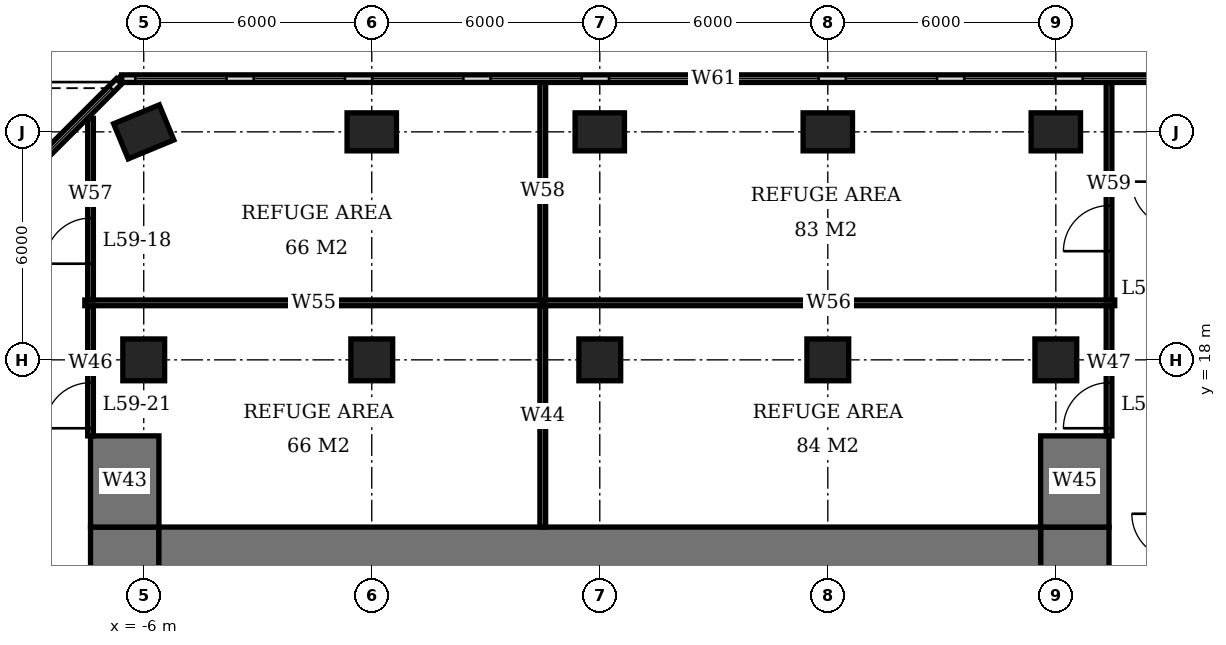
"""IFC4 building model, lengths in metres.
Left out: names, types, materials, properties, quantities, classifications, styles, units other than length and angle.
Written with IfcOpenShell. Run it as: python <this file> out.ifc"""

import sys

from ifc_helpers import new_model, si_unit, direction, frame, frame_2d, origin, origin_2d, place, context, subcontext, project, spatial, rectangle, extrude, element, fill, save


model = new_model("IFC4")
c1 = context("Model", 3, precision=1e-05, world=origin(), true_north=direction((0.0, 1.0)))
c2 = subcontext(c1, "Body", "Model", "MODEL_VIEW")
j1 = project(units=[si_unit("LENGTHUNIT", "METRE"), si_unit("PLANEANGLEUNIT", "RADIAN")], contexts=[c1])
p1 = place(None, origin())
s1 = spatial("IfcSite", under=j1, at=p1, CompositionType="ELEMENT")
p2 = place(p1, origin())
s2 = spatial("IfcBuilding", under=s1, at=p2, CompositionType="ELEMENT")
p3 = place(p2, frame((0.0, 0.0, 239.6)))
s3 = spatial("IfcBuildingStorey", under=s2, at=p3, CompositionType="ELEMENT", Elevation=239.6)
p4 = place(p3, frame((-6.0, 18.0, 0.0), z_axis=(0.0, 0.0, 1.0), x_axis=(1.0, 0.0, 0.0)))
e1 = element("IfcColumn", 1, at=p4, inside=s3, PredefinedType="COLUMN", context=c2, shape_type="SweptSolid", body=[
    extrude(rectangle(XDim=1.1, YDim=1.1, at=origin_2d()), origin(), (0.0, 0.0, 1.0), 5.4),
])
p5 = place(p3, frame((-6.0, 24.0, 0.0), z_axis=(0.0, 0.0, 1.0), x_axis=(0.923879532511, 0.382683432365, 0.0)))
e2 = element("IfcColumn", 2, at=p5, inside=s3, PredefinedType="COLUMN", context=c2, shape_type="SweptSolid", body=[
    extrude(rectangle(XDim=1.3, YDim=1.0, at=origin_2d()), origin(), (0.0, 0.0, 1.0), 5.4),
])
p6 = place(p3, frame((0.0, 18.0, 0.0), z_axis=(0.0, 0.0, 1.0), x_axis=(1.0, 0.0, 0.0)))
e3 = element("IfcColumn", 3, at=p6, inside=s3, PredefinedType="COLUMN", context=c2, shape_type="SweptSolid", body=[
    extrude(rectangle(XDim=1.1, YDim=1.1, at=origin_2d()), origin(), (0.0, 0.0, 1.0), 5.4),
])
p7 = place(p3, frame((0.0, 24.0, 0.0), z_axis=(0.0, 0.0, 1.0), x_axis=(1.0, 0.0, 0.0)))
e4 = element("IfcColumn", 4, at=p7, inside=s3, PredefinedType="COLUMN", context=c2, shape_type="SweptSolid", body=[
    extrude(rectangle(XDim=1.3, YDim=1.0, at=origin_2d()), origin(), (0.0, 0.0, 1.0), 5.4),
])
p8 = place(p3, frame((6.0, 18.0, 0.0), z_axis=(0.0, 0.0, 1.0), x_axis=(1.0, 0.0, 0.0)))
e5 = element("IfcColumn", 5, at=p8, inside=s3, PredefinedType="COLUMN", context=c2, shape_type="SweptSolid", body=[
    extrude(rectangle(XDim=1.1, YDim=1.1, at=origin_2d()), origin(), (0.0, 0.0, 1.0), 5.4),
])
p9 = place(p3, frame((6.0, 24.0, 0.0), z_axis=(0.0, 0.0, 1.0), x_axis=(1.0, 0.0, 0.0)))
e6 = element("IfcColumn", 6, at=p9, inside=s3, PredefinedType="COLUMN", context=c2, shape_type="SweptSolid", body=[
    extrude(rectangle(XDim=1.3, YDim=1.0, at=origin_2d()), origin(), (0.0, 0.0, 1.0), 5.4),
])
p10 = place(p3, frame((12.0, 18.0, 0.0), z_axis=(0.0, 0.0, 1.0), x_axis=(1.0, 0.0, 0.0)))
e7 = element("IfcColumn", 7, at=p10, inside=s3, PredefinedType="COLUMN", context=c2, shape_type="SweptSolid", body=[
    extrude(rectangle(XDim=1.1, YDim=1.1, at=origin_2d()), origin(), (0.0, 0.0, 1.0), 5.4),
])
p11 = place(p3, frame((12.0, 24.0, 0.0), z_axis=(0.0, 0.0, 1.0), x_axis=(1.0, 0.0, 0.0)))
e8 = element("IfcColumn", 8, at=p11, inside=s3, PredefinedType="COLUMN", context=c2, shape_type="SweptSolid", body=[
    extrude(rectangle(XDim=1.3, YDim=1.0, at=origin_2d()), origin(), (0.0, 0.0, 1.0), 5.4),
])
p12 = place(p3, frame((18.0, 18.0, 0.0), z_axis=(0.0, 0.0, 1.0), x_axis=(1.0, 0.0, 0.0)))
e9 = element("IfcColumn", 9, at=p12, inside=s3, PredefinedType="COLUMN", context=c2, shape_type="SweptSolid", body=[
    extrude(rectangle(XDim=1.1, YDim=1.1, at=origin_2d()), origin(), (0.0, 0.0, 1.0), 5.4),
])
p13 = place(p3, frame((18.0, 24.0, 0.0), z_axis=(0.0, 0.0, 1.0), x_axis=(1.0, 0.0, 0.0)))
e10 = element("IfcColumn", 10, at=p13, inside=s3, PredefinedType="COLUMN", context=c2, shape_type="SweptSolid", body=[
    extrude(rectangle(XDim=1.3, YDim=1.0, at=origin_2d()), origin(), (0.0, 0.0, 1.0), 5.4),
])
p14 = place(p3, frame((-5.6, 12.6, 0.0), z_axis=(0.0, 0.0, 1.0), x_axis=(1.0, 0.0, 0.0)))
e11 = element("IfcWall", 11, at=p14, inside=s3, PredefinedType="SHEAR", context=c2, shape_type="SweptSolid", body=[
    extrude(rectangle(XDim=23.2, YDim=2.0, at=frame_2d((11.6, 0.0))), origin(), (0.0, 0.0, 1.0), 5.4),
])
p15 = place(p3, frame((-6.5, -7.6, 0.0), z_axis=(0.0, 0.0, 1.0), x_axis=(0.0, 1.0, 0.0)))
e12 = element("IfcWall", 12, at=p15, inside=s3, PredefinedType="SHEAR", context=c2, shape_type="SweptSolid", body=[
    extrude(rectangle(XDim=21.2, YDim=1.8, at=frame_2d((10.6, 0.0))), origin(), (0.0, 0.0, 1.0), 5.4),
])
p16 = place(p15, frame((7.8, 0.0, 0.0)))
e13 = element("IfcOpeningElement", 13, at=p16, cuts=e12, PredefinedType="OPENING", context=c2, shape_type="SweptSolid", body=[
    extrude(rectangle(XDim=1.8, YDim=2.4, at=frame_2d((0.9, 1.2))), frame((0.0, 0.91, 0.0), z_axis=(0.0, -1.0, 0.0), x_axis=(1.0, 0.0, 0.0)), (0.0, 0.0, 1.0), 1.82),
])
p17 = place(p3, frame((18.5, -7.6, 0.0), z_axis=(0.0, 0.0, 1.0), x_axis=(0.0, 1.0, 0.0)))
e14 = element("IfcWall", 14, at=p17, inside=s3, PredefinedType="SHEAR", context=c2, shape_type="SweptSolid", body=[
    extrude(rectangle(XDim=21.2, YDim=1.8, at=frame_2d((10.6, 0.0))), origin(), (0.0, 0.0, 1.0), 5.4),
])
p18 = place(p17, frame((9.2, 0.0, 0.0)))
e15 = element("IfcOpeningElement", 15, at=p18, cuts=e14, PredefinedType="OPENING", context=c2, shape_type="SweptSolid", body=[
    extrude(rectangle(XDim=1.8, YDim=2.4, at=frame_2d((0.9, 1.2))), frame((0.0, 0.91, 0.0), z_axis=(0.0, -1.0, 0.0), x_axis=(1.0, 0.0, 0.0)), (0.0, 0.0, 1.0), 1.82),
])
for number, where, z_axis, x_axis in (
    (16, (-6.5, 13.6, 0.0), (0.0, 0.0, 1.0), (0.0, 1.0, 0.0)),
    (17, (18.5, 13.6, 0.0), (0.0, 0.0, 1.0), (0.0, 1.0, 0.0)),
):
    element("IfcWall", number, at=place(p3, frame(where, z_axis=z_axis, x_axis=x_axis)), inside=s3, PredefinedType="SHEAR", context=c2, shape_type="SweptSolid", body=[
        extrude(rectangle(XDim=2.4, YDim=1.8, at=frame_2d((1.2, 0.0))), origin(), (0.0, 0.0, 1.0), 5.4),
    ])
p19 = place(p3, frame((24.58, 25.4, 0.0), z_axis=(0.0, 0.0, 1.0), x_axis=(-1.0, 0.0, 0.0)))
e18 = element("IfcWall", 18, at=p19, inside=s3, PredefinedType="USERDEFINED", context=c2, shape_type="SweptSolid", body=[
    extrude(rectangle(XDim=31.16, YDim=0.2, at=frame_2d((15.58, 0.0))), origin(), (0.0, 0.0, 1.0), 5.4),
])
p20 = place(p19, frame((0.358, 0.0, 0.6)))
e19 = element("IfcOpeningElement", 19, at=p20, cuts=e18, PredefinedType="OPENING", context=c2, shape_type="SweptSolid", body=[
    extrude(rectangle(XDim=2.4, YDim=3.0, at=frame_2d((1.2, 1.5))), frame((0.0, 0.11, 0.0), z_axis=(0.0, -1.0, 0.0), x_axis=(1.0, 0.0, 0.0)), (0.0, 0.0, 1.0), 0.22),
])
p21 = place(p19, frame((3.474, 0.0, 0.6)))
e20 = element("IfcOpeningElement", 20, at=p21, cuts=e18, PredefinedType="OPENING", context=c2, shape_type="SweptSolid", body=[
    extrude(rectangle(XDim=2.4, YDim=3.0, at=frame_2d((1.2, 1.5))), frame((0.0, 0.11, 0.0), z_axis=(0.0, -1.0, 0.0), x_axis=(1.0, 0.0, 0.0)), (0.0, 0.0, 1.0), 0.22),
])
p22 = place(p19, frame((6.59, 0.0, 0.6)))
e21 = element("IfcOpeningElement", 21, at=p22, cuts=e18, PredefinedType="OPENING", context=c2, shape_type="SweptSolid", body=[
    extrude(rectangle(XDim=2.4, YDim=3.0, at=frame_2d((1.2, 1.5))), frame((0.0, 0.11, 0.0), z_axis=(0.0, -1.0, 0.0), x_axis=(1.0, 0.0, 0.0)), (0.0, 0.0, 1.0), 0.22),
])
p23 = place(p19, frame((9.706, 0.0, 0.6)))
e22 = element("IfcOpeningElement", 22, at=p23, cuts=e18, PredefinedType="OPENING", context=c2, shape_type="SweptSolid", body=[
    extrude(rectangle(XDim=2.4, YDim=3.0, at=frame_2d((1.2, 1.5))), frame((0.0, 0.11, 0.0), z_axis=(0.0, -1.0, 0.0), x_axis=(1.0, 0.0, 0.0)), (0.0, 0.0, 1.0), 0.22),
])
p24 = place(p19, frame((12.822, 0.0, 0.6)))
e23 = element("IfcOpeningElement", 23, at=p24, cuts=e18, PredefinedType="OPENING", context=c2, shape_type="SweptSolid", body=[
    extrude(rectangle(XDim=2.4, YDim=3.0, at=frame_2d((1.2, 1.5))), frame((0.0, 0.11, 0.0), z_axis=(0.0, -1.0, 0.0), x_axis=(1.0, 0.0, 0.0)), (0.0, 0.0, 1.0), 0.22),
])
p25 = place(p19, frame((15.938, 0.0, 0.6)))
e24 = element("IfcOpeningElement", 24, at=p25, cuts=e18, PredefinedType="OPENING", context=c2, shape_type="SweptSolid", body=[
    extrude(rectangle(XDim=2.4, YDim=3.0, at=frame_2d((1.2, 1.5))), frame((0.0, 0.11, 0.0), z_axis=(0.0, -1.0, 0.0), x_axis=(1.0, 0.0, 0.0)), (0.0, 0.0, 1.0), 0.22),
])
p26 = place(p19, frame((19.054, 0.0, 0.6)))
e25 = element("IfcOpeningElement", 25, at=p26, cuts=e18, PredefinedType="OPENING", context=c2, shape_type="SweptSolid", body=[
    extrude(rectangle(XDim=2.4, YDim=3.0, at=frame_2d((1.2, 1.5))), frame((0.0, 0.11, 0.0), z_axis=(0.0, -1.0, 0.0), x_axis=(1.0, 0.0, 0.0)), (0.0, 0.0, 1.0), 0.22),
])
p27 = place(p19, frame((22.17, 0.0, 0.6)))
e26 = element("IfcOpeningElement", 26, at=p27, cuts=e18, PredefinedType="OPENING", context=c2, shape_type="SweptSolid", body=[
    extrude(rectangle(XDim=2.4, YDim=3.0, at=frame_2d((1.2, 1.5))), frame((0.0, 0.11, 0.0), z_axis=(0.0, -1.0, 0.0), x_axis=(1.0, 0.0, 0.0)), (0.0, 0.0, 1.0), 0.22),
])
p28 = place(p19, frame((25.286, 0.0, 0.6)))
e27 = element("IfcOpeningElement", 27, at=p28, cuts=e18, PredefinedType="OPENING", context=c2, shape_type="SweptSolid", body=[
    extrude(rectangle(XDim=2.4, YDim=3.0, at=frame_2d((1.2, 1.5))), frame((0.0, 0.11, 0.0), z_axis=(0.0, -1.0, 0.0), x_axis=(1.0, 0.0, 0.0)), (0.0, 0.0, 1.0), 0.22),
])
p29 = place(p19, frame((28.402, 0.0, 0.6)))
e28 = element("IfcOpeningElement", 28, at=p29, cuts=e18, PredefinedType="OPENING", context=c2, shape_type="SweptSolid", body=[
    extrude(rectangle(XDim=2.4, YDim=3.0, at=frame_2d((1.2, 1.5))), frame((0.0, 0.11, 0.0), z_axis=(0.0, -1.0, 0.0), x_axis=(1.0, 0.0, 0.0)), (0.0, 0.0, 1.0), 0.22),
])
p30 = place(p3, frame((-6.651, 25.329, 0.0), z_axis=(0.0, 0.0, 1.0), x_axis=(-0.707106781187, -0.707106781187, 0.0)))
e29 = element("IfcWall", 29, at=p30, inside=s3, PredefinedType="USERDEFINED", context=c2, shape_type="SweptSolid", body=[
    extrude(rectangle(XDim=9.445, YDim=0.2, at=frame_2d((4.723, 0.0))), origin(), (0.0, 0.0, 1.0), 5.4),
])
p31 = place(p30, frame((0.274, 0.0, 0.6)))
e30 = element("IfcOpeningElement", 30, at=p31, cuts=e29, PredefinedType="OPENING", context=c2, shape_type="SweptSolid", body=[
    extrude(rectangle(XDim=2.6, YDim=3.0, at=frame_2d((1.3, 1.5))), frame((0.0, 0.11, 0.0), z_axis=(0.0, -1.0, 0.0), x_axis=(1.0, 0.0, 0.0)), (0.0, 0.0, 1.0), 0.22),
])
p32 = place(p30, frame((3.423, 0.0, 0.6)))
e31 = element("IfcOpeningElement", 31, at=p32, cuts=e29, PredefinedType="OPENING", context=c2, shape_type="SweptSolid", body=[
    extrude(rectangle(XDim=2.6, YDim=3.0, at=frame_2d((1.3, 1.5))), frame((0.0, 0.11, 0.0), z_axis=(0.0, -1.0, 0.0), x_axis=(1.0, 0.0, 0.0)), (0.0, 0.0, 1.0), 0.22),
])
p33 = place(p30, frame((6.571, 0.0, 0.6)))
e32 = element("IfcOpeningElement", 32, at=p33, cuts=e29, PredefinedType="OPENING", context=c2, shape_type="SweptSolid", body=[
    extrude(rectangle(XDim=2.6, YDim=3.0, at=frame_2d((1.3, 1.5))), frame((0.0, 0.11, 0.0), z_axis=(0.0, -1.0, 0.0), x_axis=(1.0, 0.0, 0.0)), (0.0, 0.0, 1.0), 0.22),
])
p34 = place(p3, frame((-7.4, 16.0, 0.0), z_axis=(0.0, 0.0, 1.0), x_axis=(0.0, 1.0, 0.0)))
e33 = element("IfcWall", 33, at=p34, inside=s3, PredefinedType="PARTITIONING", context=c2, shape_type="SweptSolid", body=[
    extrude(rectangle(XDim=3.425, YDim=0.15, at=frame_2d((1.712, 0.0))), origin(), (0.0, 0.0, 1.0), 5.15),
])
p35 = place(p34, frame((0.2, 0.0, 0.0)))
e34 = element("IfcOpeningElement", 34, at=p35, cuts=e33, PredefinedType="OPENING", context=c2, shape_type="SweptSolid", body=[
    extrude(rectangle(XDim=1.2, YDim=2.4, at=frame_2d((0.6, 1.2))), frame((0.0, 0.085, 0.0), z_axis=(0.0, -1.0, 0.0), x_axis=(1.0, 0.0, 0.0)), (0.0, 0.0, 1.0), 0.17),
])
p36 = place(p3, frame((-7.4, 19.575, 0.0), z_axis=(0.0, 0.0, 1.0), x_axis=(0.0, 1.0, 0.0)))
e35 = element("IfcWall", 35, at=p36, inside=s3, PredefinedType="PARTITIONING", context=c2, shape_type="SweptSolid", body=[
    extrude(rectangle(XDim=4.781, YDim=0.15, at=frame_2d((2.391, 0.0))), origin(), (0.0, 0.0, 1.0), 5.15),
])
p37 = place(p36, frame((0.955, 0.0, 0.0)))
e36 = element("IfcOpeningElement", 36, at=p37, cuts=e35, PredefinedType="OPENING", context=c2, shape_type="SweptSolid", body=[
    extrude(rectangle(XDim=1.2, YDim=2.4, at=frame_2d((0.6, 1.2))), frame((0.0, 0.085, 0.0), z_axis=(0.0, -1.0, 0.0), x_axis=(1.0, 0.0, 0.0)), (0.0, 0.0, 1.0), 0.17),
])
p38 = place(p3, frame((-7.55, 19.5, 0.0), z_axis=(0.0, 0.0, 1.0), x_axis=(1.0, 0.0, 0.0)))
e37 = element("IfcWall", 37, at=p38, inside=s3, PredefinedType="PARTITIONING", context=c2, shape_type="SweptSolid", body=[
    extrude(rectangle(XDim=12.05, YDim=0.15, at=frame_2d((6.025, 0.0))), origin(), (0.0, 0.0, 1.0), 5.15),
])
p39 = place(p3, frame((4.5, 13.6, 0.0), z_axis=(0.0, 0.0, 1.0), x_axis=(0.0, 1.0, 0.0)))
e38 = element("IfcWall", 38, at=p39, inside=s3, PredefinedType="PARTITIONING", context=c2, shape_type="SweptSolid", body=[
    extrude(rectangle(XDim=5.825, YDim=0.15, at=frame_2d((2.913, 0.0))), origin(), (0.0, 0.0, 1.0), 5.15),
])
p40 = place(p3, frame((4.5, 19.575, 0.0), z_axis=(0.0, 0.0, 1.0), x_axis=(0.0, 1.0, 0.0)))
e39 = element("IfcWall", 39, at=p40, inside=s3, PredefinedType="PARTITIONING", context=c2, shape_type="SweptSolid", body=[
    extrude(rectangle(XDim=5.725, YDim=0.15, at=frame_2d((2.863, 0.0))), origin(), (0.0, 0.0, 1.0), 5.15),
])
p41 = place(p3, frame((4.5, 19.5, 0.0), z_axis=(0.0, 0.0, 1.0), x_axis=(1.0, 0.0, 0.0)))
e40 = element("IfcWall", 40, at=p41, inside=s3, PredefinedType="PARTITIONING", context=c2, shape_type="SweptSolid", body=[
    extrude(rectangle(XDim=15.05, YDim=0.15, at=frame_2d((7.525, 0.0))), origin(), (0.0, 0.0, 1.0), 5.15),
])
p42 = place(p3, frame((19.4, 16.0, 0.0), z_axis=(0.0, 0.0, 1.0), x_axis=(0.0, 1.0, 0.0)))
e41 = element("IfcWall", 41, at=p42, inside=s3, PredefinedType="PARTITIONING", context=c2, shape_type="SweptSolid", body=[
    extrude(rectangle(XDim=3.425, YDim=0.15, at=frame_2d((1.712, 0.0))), origin(), (0.0, 0.0, 1.0), 5.15),
])
p43 = place(p42, frame((0.2, 0.0, 0.0)))
e42 = element("IfcOpeningElement", 42, at=p43, cuts=e41, PredefinedType="OPENING", context=c2, shape_type="SweptSolid", body=[
    extrude(rectangle(XDim=1.2, YDim=2.4, at=frame_2d((0.6, 1.2))), frame((0.0, 0.085, 0.0), z_axis=(0.0, -1.0, 0.0), x_axis=(1.0, 0.0, 0.0)), (0.0, 0.0, 1.0), 0.17),
])
p44 = place(p3, frame((19.4, 19.575, 0.0), z_axis=(0.0, 0.0, 1.0), x_axis=(0.0, 1.0, 0.0)))
e43 = element("IfcWall", 43, at=p44, inside=s3, PredefinedType="PARTITIONING", context=c2, shape_type="SweptSolid", body=[
    extrude(rectangle(XDim=5.725, YDim=0.15, at=frame_2d((2.863, 0.0))), origin(), (0.0, 0.0, 1.0), 5.15),
])
p45 = place(p44, frame((1.285, 0.0, 0.0)))
e44 = element("IfcOpeningElement", 44, at=p45, cuts=e43, PredefinedType="OPENING", context=c2, shape_type="SweptSolid", body=[
    extrude(rectangle(XDim=1.2, YDim=2.4, at=frame_2d((0.6, 1.2))), frame((0.0, 0.085, 0.0), z_axis=(0.0, -1.0, 0.0), x_axis=(1.0, 0.0, 0.0)), (0.0, 0.0, 1.0), 0.17),
])
p46 = place(p21, origin())
e45 = element("IfcWindow", 45, at=p46, inside=s3, PartitioningType="SINGLE_PANEL", PredefinedType="USERDEFINED", context=c2, shape_type="SweptSolid", body=[
    extrude(rectangle(XDim=2.4, YDim=3.0, at=frame_2d((1.2, 1.5))), frame((0.0, 0.03, 0.0), z_axis=(0.0, -1.0, 0.0), x_axis=(1.0, 0.0, 0.0)), (0.0, 0.0, 1.0), 0.06),
])
fill(e20, e45)
p47 = place(p22, origin())
e46 = element("IfcWindow", 46, at=p47, inside=s3, PartitioningType="SINGLE_PANEL", PredefinedType="USERDEFINED", context=c2, shape_type="SweptSolid", body=[
    extrude(rectangle(XDim=2.4, YDim=3.0, at=frame_2d((1.2, 1.5))), frame((0.0, 0.03, 0.0), z_axis=(0.0, -1.0, 0.0), x_axis=(1.0, 0.0, 0.0)), (0.0, 0.0, 1.0), 0.06),
])
fill(e21, e46)
p48 = place(p23, origin())
e47 = element("IfcWindow", 47, at=p48, inside=s3, PartitioningType="SINGLE_PANEL", PredefinedType="USERDEFINED", context=c2, shape_type="SweptSolid", body=[
    extrude(rectangle(XDim=2.4, YDim=3.0, at=frame_2d((1.2, 1.5))), frame((0.0, 0.03, 0.0), z_axis=(0.0, -1.0, 0.0), x_axis=(1.0, 0.0, 0.0)), (0.0, 0.0, 1.0), 0.06),
])
fill(e22, e47)
p49 = place(p24, origin())
e48 = element("IfcWindow", 48, at=p49, inside=s3, PartitioningType="SINGLE_PANEL", PredefinedType="USERDEFINED", context=c2, shape_type="SweptSolid", body=[
    extrude(rectangle(XDim=2.4, YDim=3.0, at=frame_2d((1.2, 1.5))), frame((0.0, 0.03, 0.0), z_axis=(0.0, -1.0, 0.0), x_axis=(1.0, 0.0, 0.0)), (0.0, 0.0, 1.0), 0.06),
])
fill(e23, e48)
p50 = place(p25, origin())
e49 = element("IfcWindow", 49, at=p50, inside=s3, PartitioningType="SINGLE_PANEL", PredefinedType="USERDEFINED", context=c2, shape_type="SweptSolid", body=[
    extrude(rectangle(XDim=2.4, YDim=3.0, at=frame_2d((1.2, 1.5))), frame((0.0, 0.03, 0.0), z_axis=(0.0, -1.0, 0.0), x_axis=(1.0, 0.0, 0.0)), (0.0, 0.0, 1.0), 0.06),
])
fill(e24, e49)
p51 = place(p26, origin())
e50 = element("IfcWindow", 50, at=p51, inside=s3, PartitioningType="SINGLE_PANEL", PredefinedType="USERDEFINED", context=c2, shape_type="SweptSolid", body=[
    extrude(rectangle(XDim=2.4, YDim=3.0, at=frame_2d((1.2, 1.5))), frame((0.0, 0.03, 0.0), z_axis=(0.0, -1.0, 0.0), x_axis=(1.0, 0.0, 0.0)), (0.0, 0.0, 1.0), 0.06),
])
fill(e25, e50)
p52 = place(p27, origin())
e51 = element("IfcWindow", 51, at=p52, inside=s3, PartitioningType="SINGLE_PANEL", PredefinedType="USERDEFINED", context=c2, shape_type="SweptSolid", body=[
    extrude(rectangle(XDim=2.4, YDim=3.0, at=frame_2d((1.2, 1.5))), frame((0.0, 0.03, 0.0), z_axis=(0.0, -1.0, 0.0), x_axis=(1.0, 0.0, 0.0)), (0.0, 0.0, 1.0), 0.06),
])
fill(e26, e51)
p53 = place(p28, origin())
e52 = element("IfcWindow", 52, at=p53, inside=s3, PartitioningType="SINGLE_PANEL", PredefinedType="USERDEFINED", context=c2, shape_type="SweptSolid", body=[
    extrude(rectangle(XDim=2.4, YDim=3.0, at=frame_2d((1.2, 1.5))), frame((0.0, 0.03, 0.0), z_axis=(0.0, -1.0, 0.0), x_axis=(1.0, 0.0, 0.0)), (0.0, 0.0, 1.0), 0.06),
])
fill(e27, e52)
p54 = place(p29, origin())
e53 = element("IfcWindow", 53, at=p54, inside=s3, PartitioningType="SINGLE_PANEL", PredefinedType="USERDEFINED", context=c2, shape_type="SweptSolid", body=[
    extrude(rectangle(XDim=2.4, YDim=3.0, at=frame_2d((1.2, 1.5))), frame((0.0, 0.03, 0.0), z_axis=(0.0, -1.0, 0.0), x_axis=(1.0, 0.0, 0.0)), (0.0, 0.0, 1.0), 0.06),
])
fill(e28, e53)
p55 = place(p31, origin())
e54 = element("IfcWindow", 54, at=p55, inside=s3, PartitioningType="SINGLE_PANEL", PredefinedType="USERDEFINED", context=c2, shape_type="SweptSolid", body=[
    extrude(rectangle(XDim=2.6, YDim=3.0, at=frame_2d((1.3, 1.5))), frame((0.0, 0.03, 0.0), z_axis=(0.0, -1.0, 0.0), x_axis=(1.0, 0.0, 0.0)), (0.0, 0.0, 1.0), 0.06),
])
fill(e30, e54)
p56 = place(p37, origin())
e55 = element("IfcDoor", 55, at=p56, inside=s3, OperationType="SINGLE_SWING_LEFT", PredefinedType="DOOR", context=c2, shape_type="SweptSolid", body=[
    extrude(rectangle(XDim=1.2, YDim=2.4, at=frame_2d((0.6, 1.2))), frame((0.0, 0.025, 0.0), z_axis=(0.0, -1.0, 0.0), x_axis=(1.0, 0.0, 0.0)), (0.0, 0.0, 1.0), 0.05),
])
fill(e36, e55)
p57 = place(p45, origin())
e56 = element("IfcDoor", 56, at=p57, inside=s3, OperationType="SINGLE_SWING_LEFT", PredefinedType="DOOR", context=c2, shape_type="SweptSolid", body=[
    extrude(rectangle(XDim=1.2, YDim=2.4, at=frame_2d((0.6, 1.2))), frame((0.0, 0.025, 0.0), z_axis=(0.0, -1.0, 0.0), x_axis=(1.0, 0.0, 0.0)), (0.0, 0.0, 1.0), 0.05),
])
fill(e44, e56)
p58 = place(p43, origin())
e57 = element("IfcDoor", 57, at=p58, inside=s3, OperationType="SINGLE_SWING_LEFT", PredefinedType="DOOR", context=c2, shape_type="SweptSolid", body=[
    extrude(rectangle(XDim=1.2, YDim=2.4, at=frame_2d((0.6, 1.2))), frame((0.0, 0.025, 0.0), z_axis=(0.0, -1.0, 0.0), x_axis=(1.0, 0.0, 0.0)), (0.0, 0.0, 1.0), 0.05),
])
fill(e42, e57)
p59 = place(p35, origin())
e58 = element("IfcDoor", 58, at=p59, inside=s3, OperationType="SINGLE_SWING_LEFT", PredefinedType="DOOR", context=c2, shape_type="SweptSolid", body=[
    extrude(rectangle(XDim=1.2, YDim=2.4, at=frame_2d((0.6, 1.2))), frame((0.0, 0.025, 0.0), z_axis=(0.0, -1.0, 0.0), x_axis=(1.0, 0.0, 0.0)), (0.0, 0.0, 1.0), 0.05),
])
fill(e34, e58)
save(model, sys.argv[1])
